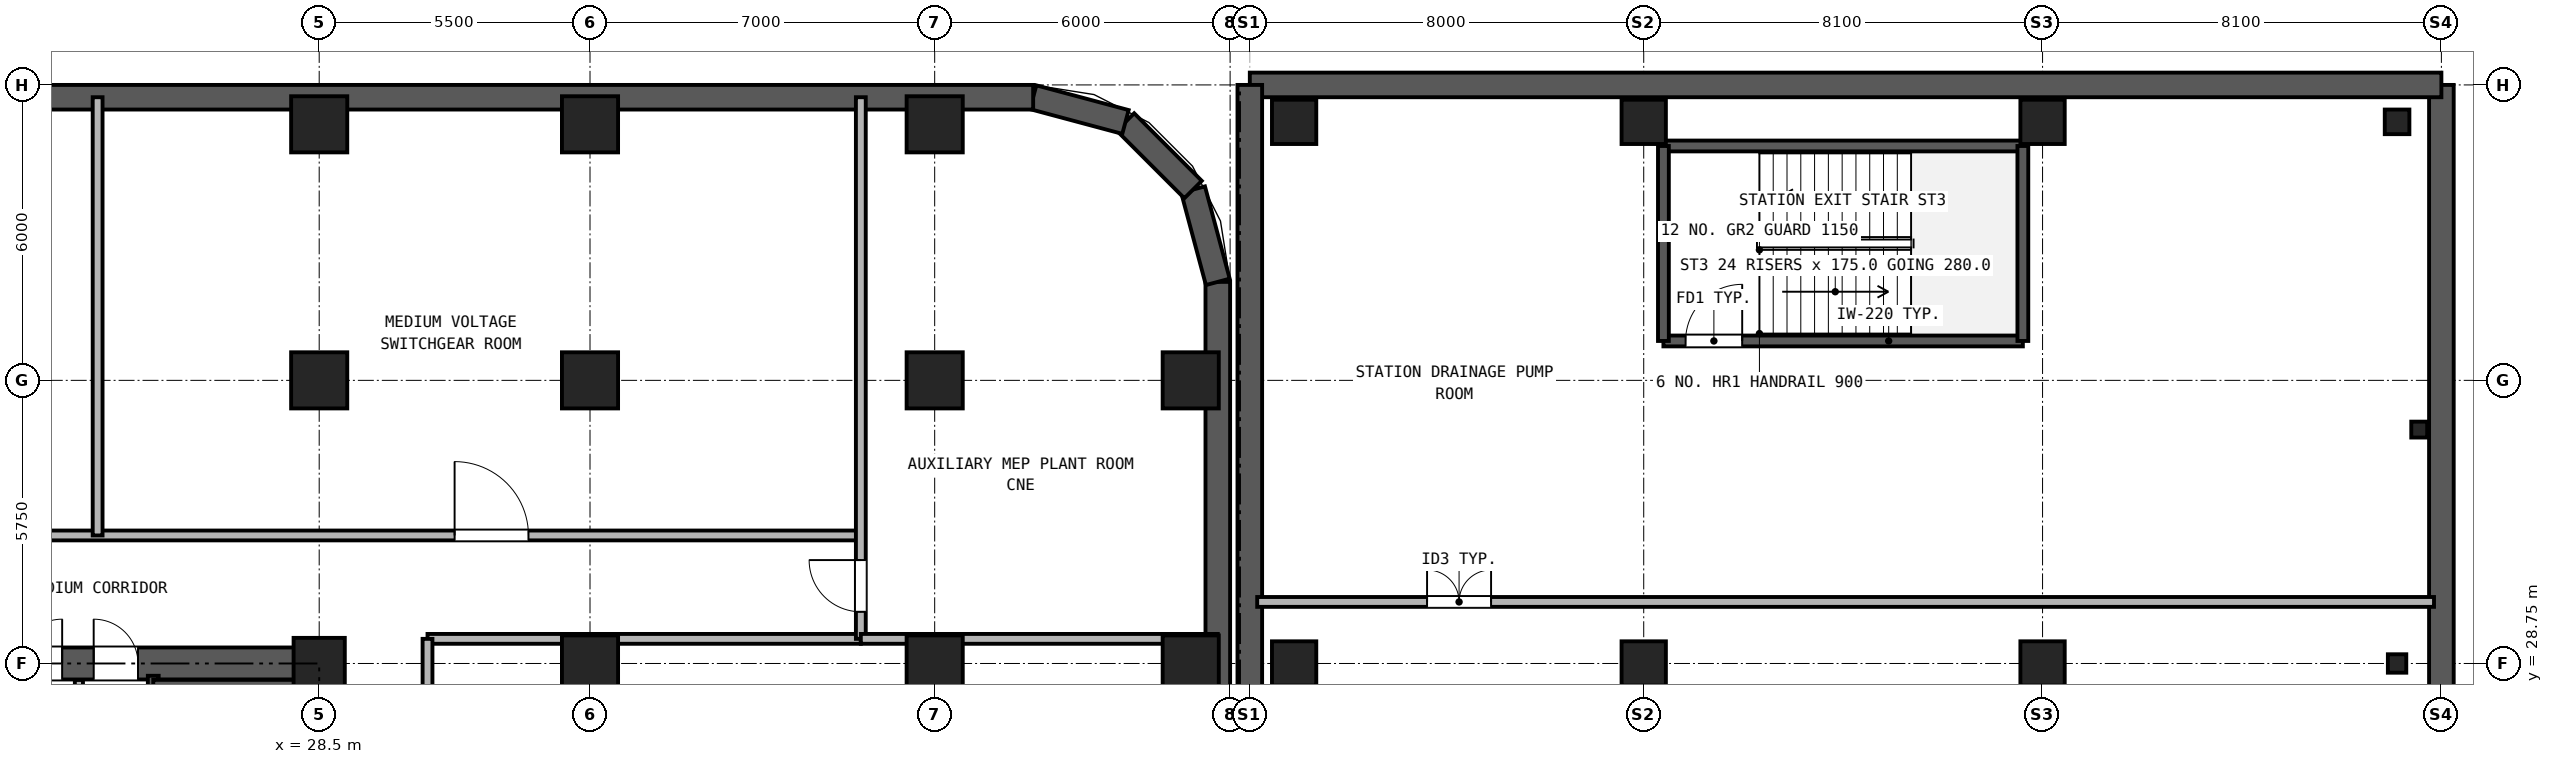
"""IFC4 building model, lengths in metres.
Left out: names, types, materials, properties, quantities, classifications, styles, units other than length and angle.
Written with IfcOpenShell. Run it as: python <this file> out.ifc"""

import sys

from ifc_helpers import new_model, si_unit, direction, frame, frame_2d, origin, origin_2d, place, context, subcontext, project, spatial, rectangle, hollow_rectangle, i_section, extrude, source, transform, mapped, element, fill, save


model = new_model("IFC4")
c1 = context("Model", 3, precision=1e-05, world=origin(), true_north=direction((0.0, 1.0)))
c2 = subcontext(c1, "Body", "Model", "MODEL_VIEW")
j1 = project(units=[si_unit("LENGTHUNIT", "METRE"), si_unit("PLANEANGLEUNIT", "RADIAN")], contexts=[c1])
p1 = place(None, origin())
s1 = spatial("IfcSite", under=j1, at=p1, CompositionType="ELEMENT")
p2 = place(p1, origin())
s2 = spatial("IfcBuilding", under=s1, at=p2, CompositionType="ELEMENT")
p3 = place(p2, frame((0.0, 0.0, -8.4)))
s3 = spatial("IfcBuildingStorey", under=s2, at=p3, CompositionType="ELEMENT", Elevation=-8.4)
m1 = source(origin(), c2, "Body", "SweptSolid", [
    extrude(hollow_rectangle(XDim=1.14, YDim=1.14, WallThickness=0.07, at=origin_2d()), origin(), (0.0, 0.0, 1.0), 3.88),
])
for number, where, z_axis, x_axis in (
    (1, (28.5, 39.7, 0.0), (0.0, 0.0, 1.0), (1.0, 0.0, 0.0)),
    (2, (34.0, 39.7, 0.0), (0.0, 0.0, 1.0), (1.0, 0.0, 0.0)),
    (3, (41.0, 39.7, 0.0), (0.0, 0.0, 1.0), (1.0, 0.0, 0.0)),
    (4, (46.2, 28.75, 0.0), (0.0, 0.0, 1.0), (1.0, 0.0, 0.0)),
    (5, (46.2, 34.5, 0.0), (0.0, 0.0, 1.0), (1.0, 0.0, 0.0)),
):
    element("IfcColumn", number, at=place(p3, frame(where, z_axis=z_axis, x_axis=x_axis)), inside=s3, PredefinedType="COLUMN", context=c2, shape_type="MappedRepresentation", body=[
        mapped(m1, transform((0.0, 0.0, 0.0), x_axis=(1.0, 0.0, 0.0), y_axis=(0.0, 1.0, 0.0), z_axis=(0.0, 0.0, 1.0), scale=1.0)),
    ])
m2 = source(origin(), c2, "Body", "SweptSolid", [
    extrude(hollow_rectangle(XDim=1.04, YDim=1.04, WallThickness=0.065, at=origin_2d()), origin(), (0.0, 0.0, 1.0), 3.88),
])
p4 = place(p3, frame((28.5, 28.75, 0.0), z_axis=(0.0, 0.0, 1.0), x_axis=(1.0, 0.0, 0.0)))
e6 = element("IfcColumn", 6, at=p4, inside=s3, PredefinedType="COLUMN", context=c2, shape_type="MappedRepresentation", body=[
    mapped(m2, transform((0.0, 0.0, 0.0), x_axis=(1.0, 0.0, 0.0), y_axis=(0.0, 1.0, 0.0), z_axis=(0.0, 0.0, 1.0), scale=1.0)),
])
for number, where, z_axis, x_axis in (
    (7, (28.5, 34.5, 0.0), (0.0, 0.0, 1.0), (1.0, 0.0, 0.0)),
    (8, (34.0, 28.75, 0.0), (0.0, 0.0, 1.0), (1.0, 0.0, 0.0)),
    (9, (34.0, 34.5, 0.0), (0.0, 0.0, 1.0), (1.0, 0.0, 0.0)),
    (10, (41.0, 28.75, 0.0), (0.0, 0.0, 1.0), (1.0, 0.0, 0.0)),
    (11, (41.0, 34.5, 0.0), (0.0, 0.0, 1.0), (1.0, 0.0, 0.0)),
):
    element("IfcColumn", number, at=place(p3, frame(where, z_axis=z_axis, x_axis=x_axis)), inside=s3, PredefinedType="COLUMN", context=c2, shape_type="MappedRepresentation", body=[
        mapped(m1, transform((0.0, 0.0, 0.0), x_axis=(1.0, 0.0, 0.0), y_axis=(0.0, 1.0, 0.0), z_axis=(0.0, 0.0, 1.0), scale=1.0)),
    ])
m3 = source(origin(), c2, "Body", "SweptSolid", [
    extrude(hollow_rectangle(XDim=0.7, YDim=0.9, WallThickness=0.04, at=origin_2d()), origin(), (0.0, 0.0, 1.0), 3.88),
])
for number, where, z_axis, x_axis in (
    (12, (48.3, 28.75, 0.0), (0.0, 0.0, 1.0), (1.0, 0.0, 0.0)),
    (13, (48.3, 39.75, 0.0), (0.0, 0.0, 1.0), (1.0, 0.0, 0.0)),
    (14, (55.4, 28.75, 0.0), (0.0, 0.0, 1.0), (1.0, 0.0, 0.0)),
    (15, (55.4, 39.75, 0.0), (0.0, 0.0, 1.0), (1.0, 0.0, 0.0)),
    (16, (63.5, 28.75, 0.0), (0.0, 0.0, 1.0), (1.0, 0.0, 0.0)),
    (17, (63.5, 39.75, 0.0), (0.0, 0.0, 1.0), (1.0, 0.0, 0.0)),
):
    element("IfcColumn", number, at=place(p3, frame(where, z_axis=z_axis, x_axis=x_axis)), inside=s3, PredefinedType="COLUMN", context=c2, shape_type="MappedRepresentation", body=[
        mapped(m3, transform((0.0, 0.0, 0.0), x_axis=(1.0, 0.0, 0.0), y_axis=(0.0, 1.0, 0.0), z_axis=(0.0, 0.0, 1.0), scale=1.0)),
    ])
m4 = source(origin(), c2, "Body", "SweptSolid", [
    extrude(i_section(OverallWidth=0.374, OverallDepth=0.372, WebThickness=0.016, FlangeThickness=0.026, at=origin_2d()), origin(), (0.0, 0.0, 1.0), 3.88),
])
p5 = place(p3, frame((70.7, 28.75, 0.0), z_axis=(0.0, 0.0, 1.0), x_axis=(1.0, 0.0, 0.0)))
e18 = element("IfcColumn", 18, at=p5, inside=s3, PredefinedType="COLUMN", context=c2, shape_type="MappedRepresentation", body=[
    mapped(m4, transform((0.0, 0.0, 0.0), x_axis=(1.0, 0.0, 0.0), y_axis=(0.0, 1.0, 0.0), z_axis=(0.0, 0.0, 1.0), scale=1.0)),
])
m5 = source(origin(), c2, "Body", "SweptSolid", [
    extrude(hollow_rectangle(XDim=0.5, YDim=0.5, WallThickness=0.025, at=origin_2d()), origin(), (0.0, 0.0, 1.0), 3.88),
])
p6 = place(p3, frame((70.7, 39.75, 0.0), z_axis=(0.0, 0.0, 1.0), x_axis=(1.0, 0.0, 0.0)))
e19 = element("IfcColumn", 19, at=p6, inside=s3, PredefinedType="COLUMN", context=c2, shape_type="MappedRepresentation", body=[
    mapped(m5, transform((0.0, 0.0, 0.0), x_axis=(1.0, 0.0, 0.0), y_axis=(0.0, 1.0, 0.0), z_axis=(0.0, 0.0, 1.0), scale=1.0)),
])
m6 = source(origin(), c2, "Body", "SweptSolid", [
    extrude(i_section(OverallWidth=0.309, OverallDepth=0.323, WebThickness=0.014, FlangeThickness=0.023, at=origin_2d()), origin(), (0.0, 0.0, 1.0), 3.88),
])
p7 = place(p3, frame((71.15, 33.5, 0.0), z_axis=(0.0, 0.0, 1.0), x_axis=(1.0, 0.0, 0.0)))
e20 = element("IfcColumn", 20, at=p7, inside=s3, PredefinedType="PILASTER", context=c2, shape_type="MappedRepresentation", body=[
    mapped(m6, transform((0.0, 0.0, 0.0), x_axis=(1.0, 0.0, 0.0), y_axis=(0.0, 1.0, 0.0), z_axis=(0.0, 0.0, 1.0), scale=1.0)),
])
p8 = place(p3, frame((46.75, 4.0, 0.0), z_axis=(0.0, 0.0, 1.0), x_axis=(0.0, 1.0, 0.0)))
e21 = element("IfcWall", 21, at=p8, inside=s3, PredefinedType="USERDEFINED", context=c2, shape_type="SweptSolid", body=[
    extrude(rectangle(XDim=32.5, YDim=0.5, at=frame_2d((16.25, 0.0))), origin(), (0.0, 0.0, 1.0), 3.88),
])
for number, where, z_axis, x_axis in (
    (22, (46.75, 36.5, 0.0), (0.0, 0.0, 1.0), (-0.259, 0.966, 0.0)),
    (23, (46.248, 38.375, 0.0), (0.0, 0.0, 1.0), (-0.707, 0.707, 0.0)),
    (24, (44.875, 39.748, 0.0), (0.0, 0.0, 1.0), (-0.966, 0.259, 0.0)),
):
    element("IfcWall", number, at=place(p3, frame(where, z_axis=z_axis, x_axis=x_axis)), inside=s3, PredefinedType="USERDEFINED", context=c2, shape_type="SweptSolid", body=[
        extrude(rectangle(XDim=1.941, YDim=0.5, at=frame_2d((0.971, 0.0))), origin(), (0.0, 0.0, 1.0), 3.88),
    ])
p9 = place(p3, frame((43.0, 40.25, 0.0), z_axis=(0.0, 0.0, 1.0), x_axis=(-1.0, 0.0, 0.0)))
e25 = element("IfcWall", 25, at=p9, inside=s3, PredefinedType="USERDEFINED", context=c2, shape_type="SweptSolid", body=[
    extrude(rectangle(XDim=39.0, YDim=0.5, at=frame_2d((19.5, 0.0))), origin(), (0.0, 0.0, 1.0), 3.88),
])
p10 = place(p3, frame((71.6, -11.1, 0.0), z_axis=(0.0, 0.0, 1.0), x_axis=(0.0, 1.0, 0.0)))
e26 = element("IfcWall", 26, at=p10, inside=s3, PredefinedType="USERDEFINED", context=c2, shape_type="SweptSolid", body=[
    extrude(rectangle(XDim=51.6, YDim=0.5, at=frame_2d((25.8, 0.0))), origin(), (0.0, 0.0, 1.0), 3.88),
])
p11 = place(p3, frame((71.6, 40.5, 0.0), z_axis=(0.0, 0.0, 1.0), x_axis=(-1.0, 0.0, 0.0)))
e27 = element("IfcWall", 27, at=p11, inside=s3, PredefinedType="USERDEFINED", context=c2, shape_type="SweptSolid", body=[
    extrude(rectangle(XDim=24.2, YDim=0.5, at=frame_2d((12.1, 0.0))), origin(), (0.0, 0.0, 1.0), 3.88),
])
p12 = place(p3, frame((47.4, 40.5, 0.0), z_axis=(0.0, 0.0, 1.0), x_axis=(0.0, -1.0, 0.0)))
e28 = element("IfcWall", 28, at=p12, inside=s3, PredefinedType="USERDEFINED", context=c2, shape_type="SweptSolid", body=[
    extrude(rectangle(XDim=40.9, YDim=0.5, at=frame_2d((20.45, 0.0))), origin(), (0.0, 0.0, 1.0), 3.88),
])
p13 = place(p3, frame((18.175, 28.75, 0.0), z_axis=(0.0, 0.0, 1.0), x_axis=(1.0, 0.0, 0.0)))
e29 = element("IfcWall", 29, at=p13, inside=s3, PredefinedType="SHEAR", context=c2, shape_type="SweptSolid", body=[
    extrude(rectangle(XDim=10.65, YDim=0.65, at=frame_2d((5.325, 0.0))), origin(), (0.0, 0.0, 1.0), 3.88),
])
p14 = place(p13, frame((4.205, 0.0, 0.0)))
e30 = element("IfcOpeningElement", 30, at=p14, cuts=e29, PredefinedType="OPENING", context=c2, shape_type="SweptSolid", body=[
    extrude(rectangle(XDim=0.9, YDim=2.05, at=frame_2d((0.45, 1.025))), frame((0.0, 0.335, 0.0), z_axis=(0.0, -1.0, 0.0), x_axis=(1.0, 0.0, 0.0)), (0.0, 0.0, 1.0), 0.67),
])
p15 = place(p13, frame((5.745, 0.0, 0.0)))
e31 = element("IfcOpeningElement", 31, at=p15, cuts=e29, PredefinedType="OPENING", context=c2, shape_type="SweptSolid", body=[
    extrude(rectangle(XDim=0.9, YDim=2.05, at=frame_2d((0.45, 1.025))), frame((0.0, 0.335, 0.0), z_axis=(0.0, -1.0, 0.0), x_axis=(1.0, 0.0, 0.0)), (0.0, 0.0, 1.0), 0.67),
])
p16 = place(p3, frame((28.5, 11.825, 0.0), z_axis=(0.0, 0.0, 1.0), x_axis=(0.0, 1.0, 0.0)))
e32 = element("IfcWall", 32, at=p16, inside=s3, PredefinedType="SHEAR", context=c2, shape_type="SweptSolid", body=[
    extrude(rectangle(XDim=16.6, YDim=0.65, at=frame_2d((8.3, 0.0))), origin(), (0.0, 0.0, 1.0), 3.88),
])
p17 = place(p16, frame((7.325, 0.0, 0.0)))
e33 = element("IfcOpeningElement", 33, at=p17, cuts=e32, PredefinedType="OPENING", context=c2, shape_type="SweptSolid", body=[
    extrude(rectangle(XDim=1.15, YDim=2.2, at=frame_2d((0.575, 1.1))), frame((0.0, 0.335, 0.0), z_axis=(0.0, -1.0, 0.0), x_axis=(1.0, 0.0, 0.0)), (0.0, 0.0, 1.0), 0.67),
])
p18 = place(p3, frame((25.13, 21.39, 0.0), z_axis=(0.0, 0.0, 1.0), x_axis=(0.0, 1.0, 0.0)))
e34 = element("IfcWall", 34, at=p18, inside=s3, PredefinedType="SOLIDWALL", context=c2, shape_type="SweptSolid", body=[
    extrude(rectangle(XDim=7.11, YDim=0.22, at=frame_2d((3.555, 0.0))), origin(), (0.0, 0.0, 1.0), 3.88),
])
p19 = place(p3, frame((25.13, 28.335, 0.0), z_axis=(0.0, 0.0, 1.0), x_axis=(1.0, 0.0, 0.0)))
e35 = element("IfcWall", 35, at=p19, inside=s3, PredefinedType="PARTITIONING", context=c2, shape_type="SweptSolid", body=[
    extrude(rectangle(XDim=3.035, YDim=0.165, at=frame_2d((1.518, 0.0))), origin(), (0.0, 0.0, 1.0), 3.88),
])
p20 = place(p3, frame((23.62, 24.4, 0.0), z_axis=(0.0, 0.0, 1.0), x_axis=(0.0, 1.0, 0.0)))
e36 = element("IfcWall", 36, at=p20, inside=s3, PredefinedType="PARTITIONING", context=c2, shape_type="SweptSolid", body=[
    extrude(rectangle(XDim=4.015, YDim=0.165, at=frame_2d((2.008, 0.0))), origin(), (0.0, 0.0, 1.0), 3.88),
])
p21 = place(p3, frame((7.5, 31.35, 0.0), z_axis=(0.0, 0.0, 1.0), x_axis=(1.0, 0.0, 0.0)))
e37 = element("IfcWall", 37, at=p21, inside=s3, PredefinedType="PARTITIONING", context=c2, shape_type="SweptSolid", body=[
    extrude(rectangle(XDim=32.0, YDim=0.2, at=frame_2d((16.0, 0.0))), origin(), (0.0, 0.0, 1.0), 3.88),
])
p22 = place(p21, frame((7.75, 0.0, 0.0)))
e38 = element("IfcOpeningElement", 38, at=p22, cuts=e37, PredefinedType="OPENING", context=c2, shape_type="SweptSolid", body=[
    extrude(rectangle(XDim=1.5, YDim=2.25, at=frame_2d((0.75, 1.125))), frame((0.0, 0.11, 0.0), z_axis=(0.0, -1.0, 0.0), x_axis=(1.0, 0.0, 0.0)), (0.0, 0.0, 1.0), 0.22),
])
p23 = place(p21, frame((23.75, 0.0, 0.0)))
e39 = element("IfcOpeningElement", 39, at=p23, cuts=e37, PredefinedType="OPENING", context=c2, shape_type="SweptSolid", body=[
    extrude(rectangle(XDim=1.5, YDim=2.25, at=frame_2d((0.75, 1.125))), frame((0.0, 0.11, 0.0), z_axis=(0.0, -1.0, 0.0), x_axis=(1.0, 0.0, 0.0)), (0.0, 0.0, 1.0), 0.22),
])
p24 = place(p3, frame((30.7, 29.25, 0.0), z_axis=(0.0, 0.0, 1.0), x_axis=(1.0, 0.0, 0.0)))
e40 = element("IfcWall", 40, at=p24, inside=s3, PredefinedType="PARTITIONING", context=c2, shape_type="SweptSolid", body=[
    extrude(rectangle(XDim=8.8, YDim=0.2, at=frame_2d((4.4, 0.0))), origin(), (0.0, 0.0, 1.0), 3.88),
])
p25 = place(p3, frame((30.7, 11.0, 0.0), z_axis=(0.0, 0.0, 1.0), x_axis=(0.0, 1.0, 0.0)))
e41 = element("IfcWall", 41, at=p25, inside=s3, PredefinedType="PARTITIONING", context=c2, shape_type="SweptSolid", body=[
    extrude(rectangle(XDim=18.25, YDim=0.2, at=frame_2d((9.125, 0.0))), origin(), (0.0, 0.0, 1.0), 3.88),
])
p26 = place(p25, frame((8.625, 0.0, 0.0)))
e42 = element("IfcOpeningElement", 42, at=p26, cuts=e41, PredefinedType="OPENING", context=c2, shape_type="SweptSolid", body=[
    extrude(rectangle(XDim=0.95, YDim=2.15, at=frame_2d((0.475, 1.075))), frame((0.0, 0.11, 0.0), z_axis=(0.0, -1.0, 0.0), x_axis=(1.0, 0.0, 0.0)), (0.0, 0.0, 1.0), 0.22),
])
p27 = place(p3, frame((39.5, 29.25, 0.0), z_axis=(0.0, 0.0, 1.0), x_axis=(0.0, 1.0, 0.0)))
e43 = element("IfcWall", 43, at=p27, inside=s3, PredefinedType="PARTITIONING", context=c2, shape_type="SweptSolid", body=[
    extrude(rectangle(XDim=11.0, YDim=0.2, at=frame_2d((5.5, 0.0))), origin(), (0.0, 0.0, 1.0), 3.88),
])
p28 = place(p27, frame((0.55, 0.0, 0.0)))
e44 = element("IfcOpeningElement", 44, at=p28, cuts=e43, PredefinedType="OPENING", context=c2, shape_type="SweptSolid", body=[
    extrude(rectangle(XDim=1.05, YDim=2.15, at=frame_2d((0.525, 1.075))), frame((0.0, 0.11, 0.0), z_axis=(0.0, -1.0, 0.0), x_axis=(1.0, 0.0, 0.0)), (0.0, 0.0, 1.0), 0.22),
])
p29 = place(p3, frame((39.5, 29.25, 0.0), z_axis=(0.0, 0.0, 1.0), x_axis=(1.0, 0.0, 0.0)))
e45 = element("IfcWall", 45, at=p29, inside=s3, PredefinedType="PARTITIONING", context=c2, shape_type="SweptSolid", body=[
    extrude(rectangle(XDim=7.25, YDim=0.2, at=frame_2d((3.625, 0.0))), origin(), (0.0, 0.0, 1.0), 3.88),
])
p30 = place(p3, frame((24.0, 31.35, 0.0), z_axis=(0.0, 0.0, 1.0), x_axis=(0.0, 1.0, 0.0)))
e46 = element("IfcWall", 46, at=p30, inside=s3, PredefinedType="PARTITIONING", context=c2, shape_type="SweptSolid", body=[
    extrude(rectangle(XDim=8.9, YDim=0.2, at=frame_2d((4.45, 0.0))), origin(), (0.0, 0.0, 1.0), 3.88),
])
p31 = place(p3, frame((55.8, 35.3, 0.0), z_axis=(0.0, 0.0, 1.0), x_axis=(1.0, 0.0, 0.0)))
e47 = element("IfcWall", 47, at=p31, inside=s3, PredefinedType="SOLIDWALL", context=c2, shape_type="SweptSolid", body=[
    extrude(rectangle(XDim=7.3, YDim=0.22, at=frame_2d((3.65, 0.0))), origin(), (0.0, 0.0, 1.0), 3.88),
])
p32 = place(p31, frame((0.45, 0.0, 0.0)))
e48 = element("IfcOpeningElement", 48, at=p32, cuts=e47, PredefinedType="OPENING", context=c2, shape_type="SweptSolid", body=[
    extrude(rectangle(XDim=1.15, YDim=2.2, at=frame_2d((0.575, 1.1))), frame((0.0, 0.12, 0.0), z_axis=(0.0, -1.0, 0.0), x_axis=(1.0, 0.0, 0.0)), (0.0, 0.0, 1.0), 0.24),
])
p33 = place(p3, frame((55.8, 39.26, 0.0), z_axis=(0.0, 0.0, 1.0), x_axis=(1.0, 0.0, 0.0)))
e49 = element("IfcWall", 49, at=p33, inside=s3, PredefinedType="SOLIDWALL", context=c2, shape_type="SweptSolid", body=[
    extrude(rectangle(XDim=7.3, YDim=0.22, at=frame_2d((3.65, 0.0))), origin(), (0.0, 0.0, 1.0), 3.88),
])
for number, where, z_axis, x_axis in (
    (50, (55.8, 35.3, 0.0), (0.0, 0.0, 1.0), (0.0, 1.0, 0.0)),
    (51, (63.1, 35.3, 0.0), (0.0, 0.0, 1.0), (0.0, 1.0, 0.0)),
):
    element("IfcWall", number, at=place(p3, frame(where, z_axis=z_axis, x_axis=x_axis)), inside=s3, PredefinedType="SOLIDWALL", context=c2, shape_type="SweptSolid", body=[
        extrude(rectangle(XDim=3.96, YDim=0.22, at=frame_2d((1.98, 0.0))), origin(), (0.0, 0.0, 1.0), 3.88),
    ])
p34 = place(p3, frame((47.55, 30.0, 0.0), z_axis=(0.0, 0.0, 1.0), x_axis=(1.0, 0.0, 0.0)))
e52 = element("IfcWall", 52, at=p34, inside=s3, PredefinedType="PARTITIONING", context=c2, shape_type="SweptSolid", body=[
    extrude(rectangle(XDim=23.9, YDim=0.2, at=frame_2d((11.95, 0.0))), origin(), (0.0, 0.0, 1.0), 3.88),
])
p35 = place(p34, frame((3.45, 0.0, 0.0)))
e53 = element("IfcOpeningElement", 53, at=p35, cuts=e52, PredefinedType="OPENING", context=c2, shape_type="SweptSolid", body=[
    extrude(rectangle(XDim=1.3, YDim=2.2, at=frame_2d((0.65, 1.1))), frame((0.0, 0.11, 0.0), z_axis=(0.0, -1.0, 0.0), x_axis=(1.0, 0.0, 0.0)), (0.0, 0.0, 1.0), 0.22),
])
p36 = place(p14, origin())
e54 = element("IfcDoor", 54, at=p36, inside=s3, OperationType="SINGLE_SWING_RIGHT", PredefinedType="DOOR", context=c2, shape_type="SweptSolid", body=[
    extrude(rectangle(XDim=0.9, YDim=2.05, at=frame_2d((0.45, 1.025))), frame((0.0, 0.025, 0.0), z_axis=(0.0, -1.0, 0.0), x_axis=(1.0, 0.0, 0.0)), (0.0, 0.0, 1.0), 0.05),
])
fill(e30, e54)
p37 = place(p15, origin())
e55 = element("IfcDoor", 55, at=p37, inside=s3, OperationType="SINGLE_SWING_LEFT", PredefinedType="DOOR", context=c2, shape_type="SweptSolid", body=[
    extrude(rectangle(XDim=0.9, YDim=2.05, at=frame_2d((0.45, 1.025))), frame((0.0, 0.025, 0.0), z_axis=(0.0, -1.0, 0.0), x_axis=(1.0, 0.0, 0.0)), (0.0, 0.0, 1.0), 0.05),
])
fill(e31, e55)
p38 = place(p23, origin())
e56 = element("IfcDoor", 56, at=p38, inside=s3, OperationType="SINGLE_SWING_LEFT", PredefinedType="DOOR", context=c2, shape_type="SweptSolid", body=[
    extrude(rectangle(XDim=1.5, YDim=2.25, at=frame_2d((0.75, 1.125))), frame((0.0, 0.025, 0.0), z_axis=(0.0, -1.0, 0.0), x_axis=(1.0, 0.0, 0.0)), (0.0, 0.0, 1.0), 0.05),
])
fill(e39, e56)
p39 = place(p28, origin())
e57 = element("IfcDoor", 57, at=p39, inside=s3, OperationType="SINGLE_SWING_RIGHT", PredefinedType="DOOR", context=c2, shape_type="SweptSolid", body=[
    extrude(rectangle(XDim=1.05, YDim=2.15, at=frame_2d((0.525, 1.075))), frame((0.0, 0.025, 0.0), z_axis=(0.0, -1.0, 0.0), x_axis=(1.0, 0.0, 0.0)), (0.0, 0.0, 1.0), 0.05),
])
fill(e44, e57)
p40 = place(p32, frame((1.15, 0.0, 0.0), z_axis=(0.0, 0.0, 1.0), x_axis=(-1.0, 0.0, 0.0)))
e58 = element("IfcDoor", 58, at=p40, inside=s3, OperationType="SINGLE_SWING_RIGHT", PredefinedType="DOOR", context=c2, shape_type="SweptSolid", body=[
    extrude(rectangle(XDim=1.15, YDim=2.2, at=frame_2d((0.575, 1.1))), frame((0.0, 0.025, 0.0), z_axis=(0.0, -1.0, 0.0), x_axis=(1.0, 0.0, 0.0)), (0.0, 0.0, 1.0), 0.05),
])
fill(e48, e58)
p41 = place(p35, origin())
e59 = element("IfcDoor", 59, at=p41, inside=s3, OperationType="DOUBLE_DOOR_SINGLE_SWING", PredefinedType="DOOR", context=c2, shape_type="SweptSolid", body=[
    extrude(rectangle(XDim=1.3, YDim=2.2, at=frame_2d((0.65, 1.1))), frame((0.0, 0.025, 0.0), z_axis=(0.0, -1.0, 0.0), x_axis=(1.0, 0.0, 0.0)), (0.0, 0.0, 1.0), 0.05),
])
fill(e53, e59)
save(model, sys.argv[1])
